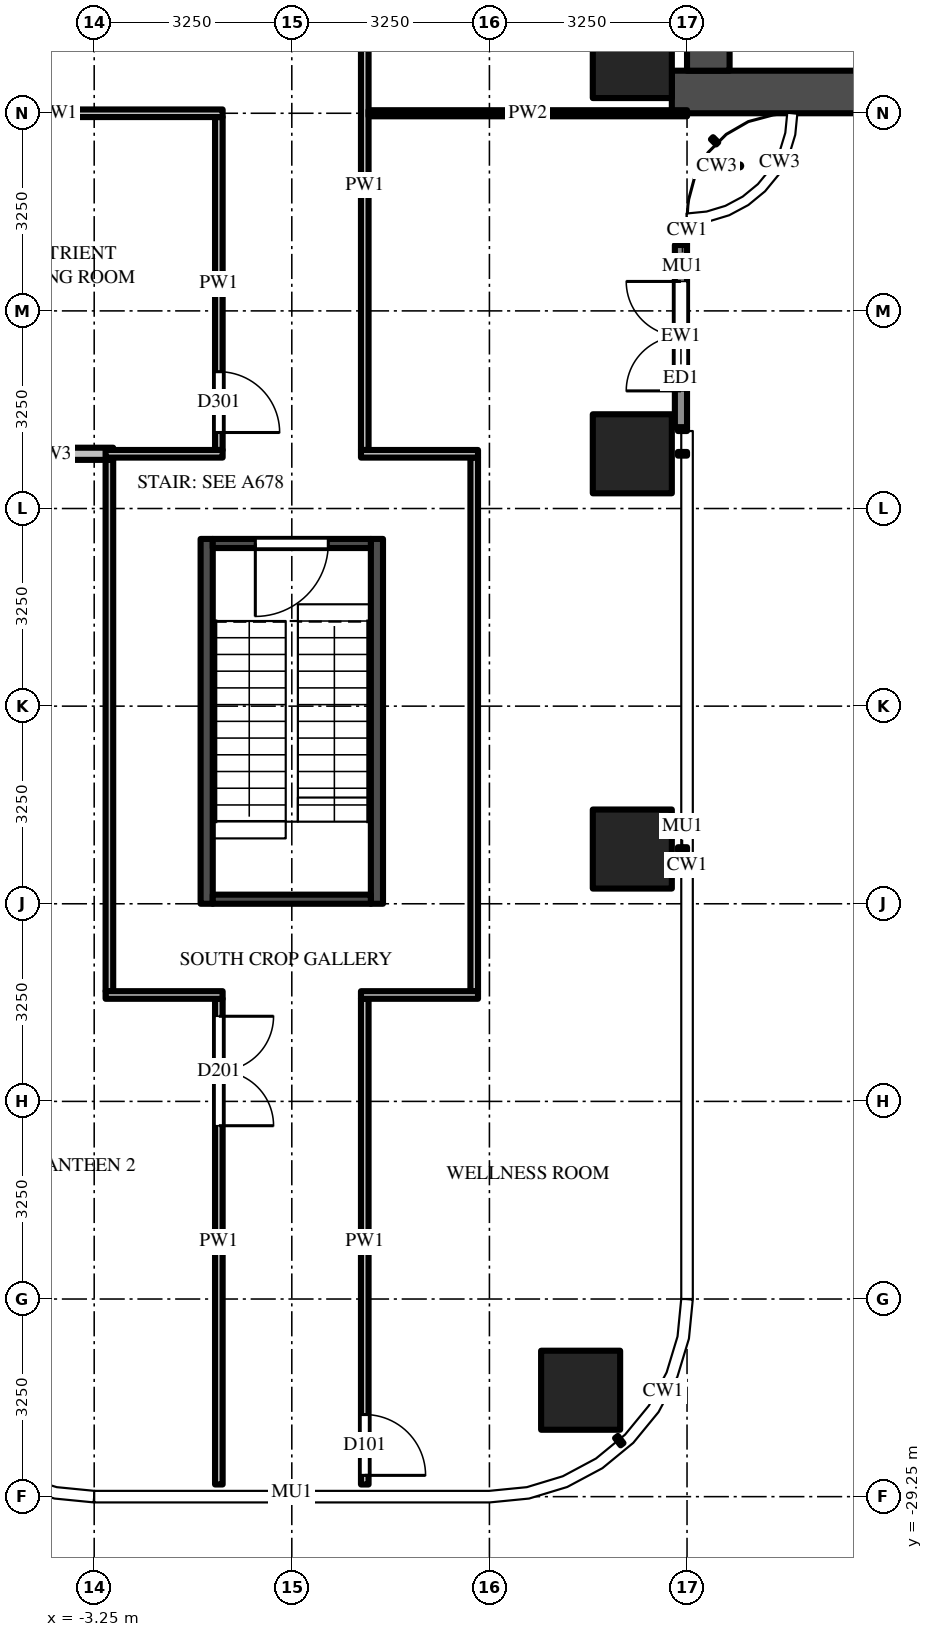
"""IFC4 building model, lengths in metres.
Left out: names, types, materials, properties, quantities, classifications, styles, units other than length and angle.
Written with IfcOpenShell. Run it as: python <this file> out.ifc"""

import sys

from ifc_helpers import new_model, si_unit, direction, frame, frame_2d, origin, origin_2d, place, context, subcontext, project, spatial, rectangle, extrude, source, transform, mapped, element, fill, save


model = new_model("IFC4")
c1 = context("Model", 3, precision=1e-05, world=origin(), true_north=direction((0.0, 1.0)))
c2 = subcontext(c1, "Body", "Model", "MODEL_VIEW")
j1 = project(units=[si_unit("LENGTHUNIT", "METRE"), si_unit("PLANEANGLEUNIT", "RADIAN")], contexts=[c1])
p1 = place(None, origin())
s1 = spatial("IfcSite", under=j1, at=p1, CompositionType="ELEMENT")
p2 = place(p1, origin())
s2 = spatial("IfcBuilding", under=s1, at=p2, CompositionType="ELEMENT")
p3 = place(p2, frame((0.0, 0.0, 111.0)))
s3 = spatial("IfcBuildingStorey", under=s2, at=p3, CompositionType="ELEMENT", Elevation=111.0)
m1 = source(origin(), c2, "Body", "SweptSolid", [
    extrude(rectangle(XDim=1.3, YDim=1.3, at=origin_2d()), origin(), (0.0, 0.0, 1.0), 4.5),
])
for number, where, z_axis, x_axis in (
    (1, (5.6, -5.6, 0.0), (0.0, 0.0, 1.0), (1.0, 0.0, 0.0)),
    (2, (5.6, -12.1, 0.0), (0.0, 0.0, 1.0), (1.0, 0.0, 0.0)),
    (3, (5.6, -18.6, 0.0), (0.0, 0.0, 1.0), (1.0, 0.0, 0.0)),
    (4, (4.75, -27.5, 0.0), (0.0, 0.0, 1.0), (1.0, 0.0, 0.0)),
):
    element("IfcColumn", number, at=place(p3, frame(where, z_axis=z_axis, x_axis=x_axis)), inside=s3, PredefinedType="COLUMN", context=c2, shape_type="MappedRepresentation", body=[
        mapped(m1, transform((0.0, 0.0, 0.0))),
    ])
m2 = source(origin(), c2, "Body", "SweptSolid", [
    extrude(rectangle(XDim=16.5, YDim=0.7, at=frame_2d((8.25, 0.0))), origin(), (0.0, 0.0, 1.0), 4.25),
])
p4 = place(p3, frame((6.25, -6.15, 0.0), z_axis=(0.0, 0.0, 1.0), x_axis=(1.0, 0.0, 0.0)))
e5 = element("IfcWall", 5, at=p4, inside=s3, PredefinedType="SHEAR", context=c2, shape_type="MappedRepresentation", body=[
    mapped(m2, transform((0.0, 0.0, 0.0))),
])
m3 = source(origin(), c2, "Body", "SweptSolid", [
    extrude(rectangle(XDim=9.05, YDim=0.7, at=frame_2d((4.525, 0.0))), origin(), (0.0, 0.0, 1.0), 4.25),
])
p5 = place(p3, frame((6.85, -5.8, 0.0), z_axis=(0.0, 0.0, 1.0), x_axis=(0.0, 1.0, 0.0)))
e6 = element("IfcWall", 6, at=p5, inside=s3, PredefinedType="SHEAR", context=c2, shape_type="MappedRepresentation", body=[
    mapped(m3, transform((0.0, 0.0, 0.0))),
])
m4 = source(origin(), c2, "Body", "SweptSolid", [
    extrude(rectangle(XDim=1.8, YDim=2.1, at=frame_2d((0.9, 1.05))), frame((0.0, 0.36, 0.0), z_axis=(0.0, -1.0, 0.0), x_axis=(1.0, 0.0, 0.0)), (0.0, 0.0, 1.0), 0.72),
])
p6 = place(p5, frame((3.15, 0.0, 0.0)))
e7 = element("IfcOpeningElement", 7, at=p6, cuts=e6, PredefinedType="OPENING", context=c2, shape_type="MappedRepresentation", body=[
    mapped(m4, transform((0.0, 0.0, 0.0))),
])
m5 = source(origin(), c2, "Body", "SweptSolid", [
    extrude(rectangle(XDim=6.0, YDim=0.2, at=frame_2d((3.0, 0.0))), origin(), (0.0, 0.0, 1.0), 4.25),
])
for number, where, z_axis, x_axis in (
    (8, (1.4, -13.5, 0.0), (0.0, 0.0, 1.0), (0.0, -1.0, 0.0)),
    (9, (-1.4, -13.5, 0.0), (0.0, 0.0, 1.0), (0.0, -1.0, 0.0)),
):
    element("IfcWall", number, at=place(p3, frame(where, z_axis=z_axis, x_axis=x_axis)), inside=s3, PredefinedType="SHEAR", context=c2, shape_type="MappedRepresentation", body=[
        mapped(m5, transform((0.0, 0.0, 0.0))),
    ])
m6 = source(origin(), c2, "Body", "SweptSolid", [
    extrude(rectangle(XDim=2.6, YDim=0.15, at=frame_2d((1.3, 0.0))), origin(), (0.0, 0.0, 1.0), 4.25),
])
p7 = place(p3, frame((1.3, -13.575, 0.0), z_axis=(0.0, 0.0, 1.0), x_axis=(-1.0, 0.0, 0.0)))
e10 = element("IfcWall", 10, at=p7, inside=s3, PredefinedType="SHEAR", context=c2, shape_type="MappedRepresentation", body=[
    mapped(m6, transform((0.0, 0.0, 0.0))),
])
m7 = source(origin(), c2, "Body", "SweptSolid", [
    extrude(rectangle(XDim=1.2, YDim=2.1, at=frame_2d((0.6, 1.05))), frame((0.0, 0.085, 0.0), z_axis=(0.0, -1.0, 0.0), x_axis=(1.0, 0.0, 0.0)), (0.0, 0.0, 1.0), 0.17),
])
p8 = place(p7, frame((0.7, 0.0, 0.0)))
e11 = element("IfcOpeningElement", 11, at=p8, cuts=e10, PredefinedType="OPENING", context=c2, shape_type="MappedRepresentation", body=[
    mapped(m7, transform((0.0, 0.0, 0.0))),
])
p9 = place(p3, frame((1.3, -19.425, 0.0), z_axis=(0.0, 0.0, 1.0), x_axis=(-1.0, 0.0, 0.0)))
e12 = element("IfcWall", 12, at=p9, inside=s3, PredefinedType="SHEAR", context=c2, shape_type="MappedRepresentation", body=[
    mapped(m6, transform((0.0, 0.0, 0.0))),
])
m8 = source(origin(), c2, "Body", "SweptSolid", [
    extrude(rectangle(XDim=3.0, YDim=0.2, at=frame_2d((1.5, 0.0))), origin(), (0.0, 0.0, 1.0), 4.25),
])
p10 = place(p3, frame((6.4, -11.666, 0.0), z_axis=(0.0, 0.0, 1.0), x_axis=(0.0, 1.0, 0.0)))
e13 = element("IfcWall", 13, at=p10, inside=s3, PredefinedType="SOLIDWALL", context=c2, shape_type="MappedRepresentation", body=[
    mapped(m8, transform((0.0, 0.0, 0.0))),
])
m9 = source(origin(), c2, "Body", "SweptSolid", [
    extrude(rectangle(XDim=1.8, YDim=2.4, at=frame_2d((0.9, 1.2))), frame((0.0, 0.11, 0.0), z_axis=(0.0, -1.0, 0.0), x_axis=(1.0, 0.0, 0.0)), (0.0, 0.0, 1.0), 0.22),
])
p11 = place(p10, frame((0.6, 0.0, 0.0)))
e14 = element("IfcOpeningElement", 14, at=p11, cuts=e13, PredefinedType="OPENING", context=c2, shape_type="MappedRepresentation", body=[
    mapped(m9, transform((0.0, 0.0, 0.0))),
])
m10 = source(origin(), c2, "Body", "SweptSolid", [
    extrude(rectangle(XDim=8.738, YDim=0.125, at=frame_2d((4.369, 0.0))), origin(), (0.0, 0.0, 1.0), 3.468),
])
p12 = place(p3, frame((-3.0, -20.938, 0.0), z_axis=(0.0, 0.0, 1.0), x_axis=(0.0, 1.0, 0.0)))
e15 = element("IfcWall", 15, at=p12, inside=s3, PredefinedType="PARTITIONING", context=c2, shape_type="MappedRepresentation", body=[
    mapped(m10, transform((0.0, 0.0, 0.0))),
])
m11 = source(origin(), c2, "Body", "SweptSolid", [
    extrude(rectangle(XDim=7.988, YDim=0.125, at=frame_2d((3.994, 0.0))), origin(), (0.0, 0.0, 1.0), 3.33),
])
p13 = place(p3, frame((-1.2, -21.062, 0.0), z_axis=(0.0, 0.0, 1.0), x_axis=(0.0, -1.0, 0.0)))
e16 = element("IfcWall", 16, at=p13, inside=s3, PredefinedType="PARTITIONING", context=c2, shape_type="MappedRepresentation", body=[
    mapped(m11, transform((0.0, 0.0, 0.0))),
])
m12 = source(origin(), c2, "Body", "SweptSolid", [
    extrude(rectangle(XDim=1.8, YDim=2.1, at=frame_2d((0.9, 1.05))), frame((0.0, 0.073, 0.0), z_axis=(0.0, -1.0, 0.0), x_axis=(1.0, 0.0, 0.0)), (0.0, 0.0, 1.0), 0.145),
])
p14 = place(p13, frame((0.288, 0.0, 0.0)))
e17 = element("IfcOpeningElement", 17, at=p14, cuts=e16, PredefinedType="OPENING", context=c2, shape_type="MappedRepresentation", body=[
    mapped(m12, transform((0.0, 0.0, 0.0))),
])
m13 = source(origin(), c2, "Body", "SweptSolid", [
    extrude(rectangle(XDim=5.475, YDim=0.125, at=frame_2d((2.738, 0.0))), origin(), (0.0, 0.0, 1.0), 3.468),
])
p15 = place(p3, frame((-1.2, -6.562, 0.0), z_axis=(0.0, 0.0, 1.0), x_axis=(0.0, -1.0, 0.0)))
e18 = element("IfcWall", 18, at=p15, inside=s3, PredefinedType="PARTITIONING", context=c2, shape_type="MappedRepresentation", body=[
    mapped(m13, transform((0.0, 0.0, 0.0))),
])
m14 = source(origin(), c2, "Body", "SweptSolid", [
    extrude(rectangle(XDim=1.0, YDim=2.1, at=frame_2d((0.5, 1.05))), frame((0.0, 0.073, 0.0), z_axis=(0.0, -1.0, 0.0), x_axis=(1.0, 0.0, 0.0)), (0.0, 0.0, 1.0), 0.145),
])
p16 = place(p15, frame((4.188, 0.0, 0.0)))
e19 = element("IfcOpeningElement", 19, at=p16, cuts=e18, PredefinedType="OPENING", context=c2, shape_type="MappedRepresentation", body=[
    mapped(m14, transform((0.0, 0.0, 0.0))),
])
p17 = place(p3, frame((1.2, -21.062, 0.0), z_axis=(0.0, 0.0, 1.0), x_axis=(0.0, -1.0, 0.0)))
e20 = element("IfcWall", 20, at=p17, inside=s3, PredefinedType="PARTITIONING", context=c2, shape_type="MappedRepresentation", body=[
    mapped(m11, transform((0.0, 0.0, 0.0))),
])
p18 = place(p17, frame((6.837, 0.0, 0.0)))
e21 = element("IfcOpeningElement", 21, at=p18, cuts=e20, PredefinedType="OPENING", context=c2, shape_type="MappedRepresentation", body=[
    mapped(m14, transform((0.0, 0.0, 0.0))),
])
m15 = source(origin(), c2, "Body", "SweptSolid", [
    extrude(rectangle(XDim=8.725, YDim=0.125, at=frame_2d((4.363, 0.0))), origin(), (0.0, 0.0, 1.0), 3.468),
])
p19 = place(p3, frame((1.2, -3.312, 0.0), z_axis=(0.0, 0.0, 1.0), x_axis=(0.0, -1.0, 0.0)))
e22 = element("IfcWall", 22, at=p19, inside=s3, PredefinedType="PARTITIONING", context=c2, shape_type="MappedRepresentation", body=[
    mapped(m15, transform((0.0, 0.0, 0.0))),
])
m16 = source(origin(), c2, "Body", "SweptSolid", [
    extrude(rectangle(XDim=8.775, YDim=0.125, at=frame_2d((4.387, 0.0))), origin(), (0.0, 0.0, 1.0), 3.468),
])
p20 = place(p3, frame((3.0, -12.163, 0.0), z_axis=(0.0, 0.0, 1.0), x_axis=(0.0, -1.0, 0.0)))
e23 = element("IfcWall", 23, at=p20, inside=s3, PredefinedType="PARTITIONING", context=c2, shape_type="MappedRepresentation", body=[
    mapped(m16, transform((0.0, 0.0, 0.0))),
])
m17 = source(origin(), c2, "Body", "SweptSolid", [
    extrude(rectangle(XDim=1.925, YDim=0.125, at=frame_2d((0.962, 0.0))), origin(), (0.0, 0.0, 1.0), 4.25),
])
for number, where, z_axis, x_axis in (
    (24, (-1.137, -21.0, 0.0), (0.0, 0.0, 1.0), (-1.0, 0.0, 0.0)),
    (25, (3.062, -21.0, 0.0), (0.0, 0.0, 1.0), (-1.0, 0.0, 0.0)),
):
    element("IfcWall", number, at=place(p3, frame(where, z_axis=z_axis, x_axis=x_axis)), inside=s3, PredefinedType="PARTITIONING", context=c2, shape_type="MappedRepresentation", body=[
        mapped(m17, transform((0.0, 0.0, 0.0))),
    ])
m18 = source(origin(), c2, "Body", "SweptSolid", [
    extrude(rectangle(XDim=2.012, YDim=0.2, at=frame_2d((1.006, 0.0))), origin(), (0.0, 0.0, 1.0), 3.468),
])
p21 = place(p3, frame((-4.95, -12.1, 0.0), z_axis=(0.0, 0.0, 1.0), x_axis=(1.0, 0.0, 0.0)))
e26 = element("IfcWall", 26, at=p21, inside=s3, PredefinedType="PARTITIONING", context=c2, shape_type="MappedRepresentation", body=[
    mapped(m18, transform((0.0, 0.0, 0.0))),
])
m19 = source(origin(), c2, "Body", "SweptSolid", [
    extrude(rectangle(XDim=1.925, YDim=0.125, at=frame_2d((0.962, 0.0))), origin(), (0.0, 0.0, 1.0), 3.468),
])
for number, where, z_axis, x_axis in (
    (27, (-3.062, -12.1, 0.0), (0.0, 0.0, 1.0), (1.0, 0.0, 0.0)),
    (28, (1.137, -12.1, 0.0), (0.0, 0.0, 1.0), (1.0, 0.0, 0.0)),
):
    element("IfcWall", number, at=place(p3, frame(where, z_axis=z_axis, x_axis=x_axis)), inside=s3, PredefinedType="PARTITIONING", context=c2, shape_type="MappedRepresentation", body=[
        mapped(m19, transform((0.0, 0.0, 0.0))),
    ])
m20 = source(origin(), c2, "Body", "SweptSolid", [
    extrude(rectangle(XDim=5.238, YDim=0.1, at=frame_2d((2.619, 0.0))), origin(), (0.0, 0.0, 1.0), 3.33),
])
p22 = place(p3, frame((1.262, -6.5, 0.0), z_axis=(0.0, 0.0, 1.0), x_axis=(1.0, 0.0, 0.0)))
e29 = element("IfcWall", 29, at=p22, inside=s3, PredefinedType="PARTITIONING", context=c2, shape_type="MappedRepresentation", body=[
    mapped(m20, transform((0.0, 0.0, 0.0))),
])
m21 = source(origin(), c2, "Body", "SweptSolid", [
    extrude(rectangle(XDim=5.425, YDim=0.125, at=frame_2d((2.712, 0.0))), origin(), (0.0, 0.0, 1.0), 3.33),
])
p23 = place(p3, frame((-1.137, -6.5, 0.0), z_axis=(0.0, 0.0, 1.0), x_axis=(-1.0, 0.0, 0.0)))
e30 = element("IfcWall", 30, at=p23, inside=s3, PredefinedType="PARTITIONING", context=c2, shape_type="MappedRepresentation", body=[
    mapped(m21, transform((0.0, 0.0, 0.0))),
])
m22 = source(origin(), c2, "Body", "SweptSolid", [
    extrude(rectangle(XDim=1.2, YDim=2.1, at=frame_2d((0.6, 1.05))), frame((0.0, 0.025, 0.0), z_axis=(0.0, -1.0, 0.0), x_axis=(1.0, 0.0, 0.0)), (0.0, 0.0, 1.0), 0.05),
])
p24 = place(p8, origin())
e31 = element("IfcDoor", 31, at=p24, inside=s3, OperationType="SINGLE_SWING_RIGHT", PredefinedType="DOOR", context=c2, shape_type="MappedRepresentation", body=[
    mapped(m22, transform((0.0, 0.0, 0.0))),
])
fill(e11, e31)
m23 = source(origin(), c2, "Body", "SweptSolid", [
    extrude(rectangle(XDim=1.8, YDim=2.4, at=frame_2d((0.9, 1.2))), frame((0.0, 0.025, 0.0), z_axis=(0.0, -1.0, 0.0), x_axis=(1.0, 0.0, 0.0)), (0.0, 0.0, 1.0), 0.05),
])
p25 = place(p11, origin())
e32 = element("IfcDoor", 32, at=p25, inside=s3, OperationType="DOUBLE_DOOR_SINGLE_SWING", PredefinedType="DOOR", context=c2, shape_type="MappedRepresentation", body=[
    mapped(m23, transform((0.0, 0.0, 0.0))),
])
fill(e14, e32)
m24 = source(origin(), c2, "Body", "SweptSolid", [
    extrude(rectangle(XDim=1.0, YDim=2.1, at=frame_2d((0.5, 1.05))), frame((0.0, 0.025, 0.0), z_axis=(0.0, -1.0, 0.0), x_axis=(1.0, 0.0, 0.0)), (0.0, 0.0, 1.0), 0.05),
])
p26 = place(p18, origin())
e33 = element("IfcDoor", 33, at=p26, inside=s3, OperationType="SINGLE_SWING_RIGHT", PredefinedType="DOOR", context=c2, shape_type="MappedRepresentation", body=[
    mapped(m24, transform((0.0, 0.0, 0.0))),
])
fill(e21, e33)
m25 = source(origin(), c2, "Body", "SweptSolid", [
    extrude(rectangle(XDim=1.8, YDim=2.1, at=frame_2d((0.9, 1.05))), frame((0.0, 0.025, 0.0), z_axis=(0.0, -1.0, 0.0), x_axis=(1.0, 0.0, 0.0)), (0.0, 0.0, 1.0), 0.05),
])
p27 = place(p14, origin())
e34 = element("IfcDoor", 34, at=p27, inside=s3, OperationType="DOUBLE_DOOR_SINGLE_SWING", PredefinedType="DOOR", context=c2, shape_type="MappedRepresentation", body=[
    mapped(m25, transform((0.0, 0.0, 0.0))),
])
fill(e17, e34)
p28 = place(p16, origin())
e35 = element("IfcDoor", 35, at=p28, inside=s3, OperationType="SINGLE_SWING_RIGHT", PredefinedType="DOOR", context=c2, shape_type="MappedRepresentation", body=[
    mapped(m24, transform((0.0, 0.0, 0.0))),
])
fill(e19, e35)
save(model, sys.argv[1])
